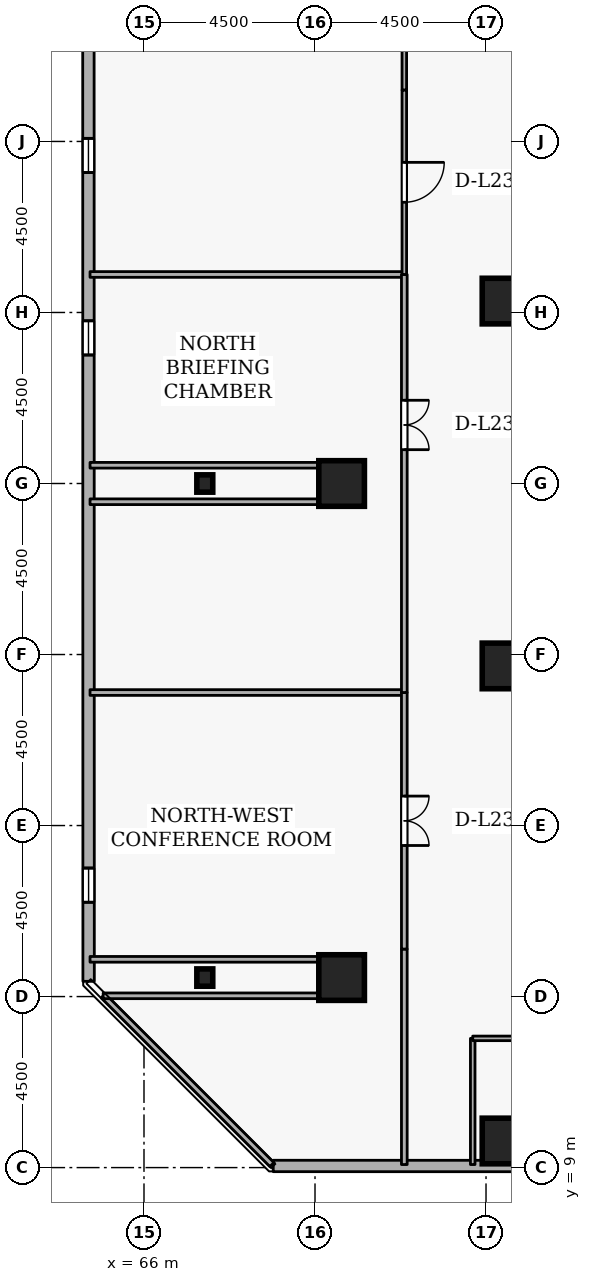
"""IFC4 building model, lengths in metres.
Left out: names, types, materials, properties, quantities, classifications, styles, units other than length and angle.
Written with IfcOpenShell. Run it as: python <this file> out.ifc"""

import sys

from ifc_helpers import new_model, si_unit, direction, frame, frame_2d, origin, origin_2d, place, context, subcontext, project, spatial, rectangle, i_section, extrude, element, fill, save


model = new_model("IFC4")
c1 = context("Model", 3, precision=1e-05, world=origin(), true_north=direction((0.0, 1.0)))
c2 = subcontext(c1, "Body", "Model", "MODEL_VIEW")
j1 = project(units=[si_unit("LENGTHUNIT", "METRE"), si_unit("PLANEANGLEUNIT", "RADIAN")], contexts=[c1])
p1 = place(None, origin())
s1 = spatial("IfcSite", under=j1, at=p1, CompositionType="ELEMENT")
p2 = place(p1, origin())
s2 = spatial("IfcBuilding", under=s1, at=p2, CompositionType="ELEMENT")
p3 = place(p2, frame((0.0, 0.0, 90.9)))
s3 = spatial("IfcBuildingStorey", under=s2, at=p3, CompositionType="ELEMENT", Elevation=90.9)
for number, where, z_axis, x_axis in (
    (1, (71.2, 14.0, 0.0), (0.0, 0.0, 1.0), (1.0, 0.0, 0.0)),
    (2, (71.2, 27.0, 0.0), (0.0, 0.0, 1.0), (1.0, 0.0, 0.0)),
    (3, (75.5, 9.7, 0.0), (0.0, 0.0, 1.0), (1.0, 0.0, 0.0)),
    (4, (75.5, 22.2, 0.0), (0.0, 0.0, 1.0), (1.0, 0.0, 0.0)),
    (5, (75.5, 31.8, 0.0), (0.0, 0.0, 1.0), (1.0, 0.0, 0.0)),
):
    element("IfcColumn", number, at=place(p3, frame(where, z_axis=z_axis, x_axis=x_axis)), inside=s3, PredefinedType="COLUMN", context=c2, shape_type="SweptSolid", body=[
        extrude(rectangle(XDim=1.2, YDim=1.2, at=origin_2d()), origin(), (0.0, 0.0, 1.0), 3.6),
    ])
for number, where, z_axis, x_axis in (
    (6, (67.6, 14.0, 0.0), (0.0, 0.0, 1.0), (1.0, 0.0, 0.0)),
    (7, (67.6, 27.0, 0.0), (0.0, 0.0, 1.0), (1.0, 0.0, 0.0)),
):
    element("IfcColumn", number, at=place(p3, frame(where, z_axis=z_axis, x_axis=x_axis)), inside=s3, PredefinedType="COLUMN", context=c2, shape_type="SweptSolid", body=[
        extrude(i_section(OverallWidth=0.418, OverallDepth=0.456, WebThickness=0.042, FlangeThickness=0.067, FilletRadius=0.015, at=origin_2d()), origin(), (0.0, 0.0, 1.0), 3.6),
    ])
p4 = place(p3, frame((69.401, 9.043, 0.0), z_axis=(0.0, 0.0, 1.0), x_axis=(0.99999997744, -0.000212414941, 0.0)))
e8 = element("IfcWall", 8, at=p4, inside=s3, PredefinedType="STANDARD", context=c2, shape_type="SweptSolid", body=[
    extrude(rectangle(XDim=34.481, YDim=0.3, at=frame_2d((17.24, 0.0))), origin(), (0.0, 0.0, 1.0), 2.7),
])
p5 = place(p4, frame((7.5, 0.0, 0.72)))
e9 = element("IfcOpeningElement", 9, at=p5, cuts=e8, PredefinedType="OPENING", context=c2, shape_type="SweptSolid", body=[
    extrude(rectangle(XDim=0.9, YDim=1.75, at=frame_2d((0.45, 0.875))), frame((0.0, 0.16, 0.0), z_axis=(0.0, -1.0, 0.0), x_axis=(1.0, 0.0, 0.0)), (0.0, 0.0, 1.0), 0.32),
])
p6 = place(p4, frame((12.3, 0.0, 0.72)))
e10 = element("IfcOpeningElement", 10, at=p6, cuts=e8, PredefinedType="OPENING", context=c2, shape_type="SweptSolid", body=[
    extrude(rectangle(XDim=0.9, YDim=1.75, at=frame_2d((0.45, 0.875))), frame((0.0, 0.16, 0.0), z_axis=(0.0, -1.0, 0.0), x_axis=(1.0, 0.0, 0.0)), (0.0, 0.0, 1.0), 0.32),
])
p7 = place(p4, frame((17.1, 0.0, 0.72)))
e11 = element("IfcOpeningElement", 11, at=p7, cuts=e8, PredefinedType="OPENING", context=c2, shape_type="SweptSolid", body=[
    extrude(rectangle(XDim=0.9, YDim=1.75, at=frame_2d((0.45, 0.875))), frame((0.0, 0.16, 0.0), z_axis=(0.0, -1.0, 0.0), x_axis=(1.0, 0.0, 0.0)), (0.0, 0.0, 1.0), 0.32),
])
p8 = place(p4, frame((21.9, 0.0, 0.72)))
e12 = element("IfcOpeningElement", 12, at=p8, cuts=e8, PredefinedType="OPENING", context=c2, shape_type="SweptSolid", body=[
    extrude(rectangle(XDim=0.9, YDim=1.75, at=frame_2d((0.45, 0.875))), frame((0.0, 0.16, 0.0), z_axis=(0.0, -1.0, 0.0), x_axis=(1.0, 0.0, 0.0)), (0.0, 0.0, 1.0), 0.32),
])
p9 = place(p4, frame((26.7, 0.0, 0.72)))
e13 = element("IfcOpeningElement", 13, at=p9, cuts=e8, PredefinedType="OPENING", context=c2, shape_type="SweptSolid", body=[
    extrude(rectangle(XDim=0.9, YDim=1.75, at=frame_2d((0.45, 0.875))), frame((0.0, 0.16, 0.0), z_axis=(0.0, -1.0, 0.0), x_axis=(1.0, 0.0, 0.0)), (0.0, 0.0, 1.0), 0.32),
])
p10 = place(p3, frame((64.535, 48.381, 0.0), z_axis=(0.0, 0.0, 1.0), x_axis=(0.000212414941, -0.99999997744, 0.0)))
e14 = element("IfcWall", 14, at=p10, inside=s3, PredefinedType="STANDARD", context=c2, shape_type="SweptSolid", body=[
    extrude(rectangle(XDim=34.481, YDim=0.3, at=frame_2d((17.24, 0.0))), origin(), (0.0, 0.0, 1.0), 2.7),
])
p11 = place(p10, frame((2.7, 0.0, 0.72)))
e15 = element("IfcOpeningElement", 15, at=p11, cuts=e14, PredefinedType="OPENING", context=c2, shape_type="SweptSolid", body=[
    extrude(rectangle(XDim=0.9, YDim=1.75, at=frame_2d((0.45, 0.875))), frame((0.0, 0.16, 0.0), z_axis=(0.0, -1.0, 0.0), x_axis=(1.0, 0.0, 0.0)), (0.0, 0.0, 1.0), 0.32),
])
p12 = place(p10, frame((12.3, 0.0, 0.72)))
e16 = element("IfcOpeningElement", 16, at=p12, cuts=e14, PredefinedType="OPENING", context=c2, shape_type="SweptSolid", body=[
    extrude(rectangle(XDim=0.9, YDim=1.75, at=frame_2d((0.45, 0.875))), frame((0.0, 0.16, 0.0), z_axis=(0.0, -1.0, 0.0), x_axis=(1.0, 0.0, 0.0)), (0.0, 0.0, 1.0), 0.32),
])
p13 = place(p10, frame((17.1, 0.0, 0.72)))
e17 = element("IfcOpeningElement", 17, at=p13, cuts=e14, PredefinedType="OPENING", context=c2, shape_type="SweptSolid", body=[
    extrude(rectangle(XDim=0.9, YDim=1.75, at=frame_2d((0.45, 0.875))), frame((0.0, 0.16, 0.0), z_axis=(0.0, -1.0, 0.0), x_axis=(1.0, 0.0, 0.0)), (0.0, 0.0, 1.0), 0.32),
])
p14 = place(p10, frame((31.5, 0.0, 0.72)))
e18 = element("IfcOpeningElement", 18, at=p14, cuts=e14, PredefinedType="OPENING", context=c2, shape_type="SweptSolid", body=[
    extrude(rectangle(XDim=0.9, YDim=1.75, at=frame_2d((0.45, 0.875))), frame((0.0, 0.16, 0.0), z_axis=(0.0, -1.0, 0.0), x_axis=(1.0, 0.0, 0.0)), (0.0, 0.0, 1.0), 0.32),
])
p15 = place(p3, frame((74.65, 9.08, 0.0), z_axis=(0.0, 0.0, 1.0), x_axis=(0.0, 1.0, 0.0)))
e19 = element("IfcWall", 19, at=p15, inside=s3, PredefinedType="PARTITIONING", context=c2, shape_type="SweptSolid", body=[
    extrude(rectangle(XDim=3.32, YDim=0.12, at=frame_2d((1.66, 0.0))), origin(), (0.0, 0.0, 1.0), 3.34),
])
p16 = place(p3, frame((74.65, 12.4, 0.0), z_axis=(0.0, 0.0, 1.0), x_axis=(1.0, 0.0, 0.0)))
e20 = element("IfcWall", 20, at=p16, inside=s3, PredefinedType="PARTITIONING", context=c2, shape_type="SweptSolid", body=[
    extrude(rectangle(XDim=4.802, YDim=0.12, at=frame_2d((2.401, 0.0))), origin(), (0.0, 0.0, 1.0), 3.34),
])
p17 = place(p3, frame((72.85, 14.75, 0.0), z_axis=(0.0, 0.0, 1.0), x_axis=(0.0, -1.0, 0.0)))
e21 = element("IfcWall", 21, at=p17, inside=s3, PredefinedType="PARTITIONING", context=c2, shape_type="SweptSolid", body=[
    extrude(rectangle(XDim=5.67, YDim=0.15, at=frame_2d((2.835, 0.0))), origin(), (0.0, 0.0, 1.0), 3.34),
])
p18 = place(p3, frame((69.365, 9.08, 0.0), z_axis=(0.0, 0.0, 1.0), x_axis=(-0.707106781187, 0.707106781187, 0.0)))
e22 = element("IfcWall", 22, at=p18, inside=s3, PredefinedType="PARTITIONING", context=c2, shape_type="SweptSolid", body=[
    extrude(rectangle(XDim=6.279, YDim=0.15, at=frame_2d((3.14, 0.0))), origin(), (0.0, 0.0, 1.0), 3.34),
])
p19 = place(p3, frame((64.926, 13.52, 0.0), z_axis=(0.0, 0.0, 1.0), x_axis=(1.0, 0.0, 0.0)))
e23 = element("IfcWall", 23, at=p19, inside=s3, PredefinedType="PARTITIONING", context=c2, shape_type="SweptSolid", body=[
    extrude(rectangle(XDim=6.274, YDim=0.15, at=frame_2d((3.137, 0.0))), origin(), (0.0, 0.0, 1.0), 3.34),
])
p20 = place(p3, frame((71.2, 14.48, 0.0), z_axis=(0.0, 0.0, 1.0), x_axis=(-1.0, 0.0, 0.0)))
e24 = element("IfcWall", 24, at=p20, inside=s3, PredefinedType="PARTITIONING", context=c2, shape_type="SweptSolid", body=[
    extrude(rectangle(XDim=6.62, YDim=0.15, at=frame_2d((3.31, 0.0))), origin(), (0.0, 0.0, 1.0), 3.34),
])
p21 = place(p3, frame((64.58, 21.5, 0.0), z_axis=(0.0, 0.0, 1.0), x_axis=(1.0, 0.0, 0.0)))
e25 = element("IfcWall", 25, at=p21, inside=s3, PredefinedType="PARTITIONING", context=c2, shape_type="SweptSolid", body=[
    extrude(rectangle(XDim=8.27, YDim=0.15, at=frame_2d((4.135, 0.0))), origin(), (0.0, 0.0, 1.0), 3.34),
])
p22 = place(p3, frame((72.85, 21.5, 0.0), z_axis=(0.0, 0.0, 1.0), x_axis=(0.0, -1.0, 0.0)))
e26 = element("IfcWall", 26, at=p22, inside=s3, PredefinedType="PARTITIONING", context=c2, shape_type="SweptSolid", body=[
    extrude(rectangle(XDim=6.75, YDim=0.15, at=frame_2d((3.375, 0.0))), origin(), (0.0, 0.0, 1.0), 3.34),
])
p23 = place(p22, frame((2.725, 0.0, 0.0)))
e27 = element("IfcOpeningElement", 27, at=p23, cuts=e26, PredefinedType="OPENING", context=c2, shape_type="SweptSolid", body=[
    extrude(rectangle(XDim=1.3, YDim=2.12, at=frame_2d((0.65, 1.06))), frame((0.0, 0.085, 0.0), z_axis=(0.0, -1.0, 0.0), x_axis=(1.0, 0.0, 0.0)), (0.0, 0.0, 1.0), 0.17),
])
for number, where, z_axis, x_axis in (
    (28, (64.58, 26.52, 0.0), (0.0, 0.0, 1.0), (1.0, 0.0, 0.0)),
    (29, (71.2, 27.48, 0.0), (0.0, 0.0, 1.0), (-1.0, 0.0, 0.0)),
):
    element("IfcWall", number, at=place(p3, frame(where, z_axis=z_axis, x_axis=x_axis)), inside=s3, PredefinedType="PARTITIONING", context=c2, shape_type="SweptSolid", body=[
        extrude(rectangle(XDim=6.62, YDim=0.15, at=frame_2d((3.31, 0.0))), origin(), (0.0, 0.0, 1.0), 3.34),
    ])
p24 = place(p3, frame((64.58, 32.5, 0.0), z_axis=(0.0, 0.0, 1.0), x_axis=(1.0, 0.0, 0.0)))
e30 = element("IfcWall", 30, at=p24, inside=s3, PredefinedType="PARTITIONING", context=c2, shape_type="SweptSolid", body=[
    extrude(rectangle(XDim=8.27, YDim=0.15, at=frame_2d((4.135, 0.0))), origin(), (0.0, 0.0, 1.0), 3.34),
])
p25 = place(p3, frame((72.85, 32.5, 0.0), z_axis=(0.0, 0.0, 1.0), x_axis=(0.0, -1.0, 0.0)))
e31 = element("IfcWall", 31, at=p25, inside=s3, PredefinedType="PARTITIONING", context=c2, shape_type="SweptSolid", body=[
    extrude(rectangle(XDim=11.0, YDim=0.15, at=frame_2d((5.5, 0.0))), origin(), (0.0, 0.0, 1.0), 3.34),
])
p26 = place(p25, frame((3.31, 0.0, 0.0)))
e32 = element("IfcOpeningElement", 32, at=p26, cuts=e31, PredefinedType="OPENING", context=c2, shape_type="SweptSolid", body=[
    extrude(rectangle(XDim=1.3, YDim=2.12, at=frame_2d((0.65, 1.06))), frame((0.0, 0.085, 0.0), z_axis=(0.0, -1.0, 0.0), x_axis=(1.0, 0.0, 0.0)), (0.0, 0.0, 1.0), 0.17),
])
p27 = place(p3, frame((72.85, 39.25, 0.0), z_axis=(0.0, 0.0, 1.0), x_axis=(0.0, -1.0, 0.0)))
e33 = element("IfcWall", 33, at=p27, inside=s3, PredefinedType="PARTITIONING", context=c2, shape_type="SweptSolid", body=[
    extrude(rectangle(XDim=1.9, YDim=0.12, at=frame_2d((0.95, 0.0))), origin(), (0.0, 0.0, 1.0), 2.895),
])
p28 = place(p3, frame((72.85, 37.35, 0.0), z_axis=(0.0, 0.0, 1.0), x_axis=(0.0, -1.0, 0.0)))
e34 = element("IfcWall", 34, at=p28, inside=s3, PredefinedType="PARTITIONING", context=c2, shape_type="SweptSolid", body=[
    extrude(rectangle(XDim=4.85, YDim=0.12, at=frame_2d((2.425, 0.0))), origin(), (0.0, 0.0, 1.0), 2.895),
])
p29 = place(p28, frame((1.9, 0.0, 0.0)))
e35 = element("IfcOpeningElement", 35, at=p29, cuts=e34, PredefinedType="OPENING", context=c2, shape_type="SweptSolid", body=[
    extrude(rectangle(XDim=1.05, YDim=2.1, at=frame_2d((0.525, 1.05))), frame((0.0, 0.07, 0.0), z_axis=(0.0, -1.0, 0.0), x_axis=(1.0, 0.0, 0.0)), (0.0, 0.0, 1.0), 0.14),
])
p30 = place(p12, origin())
e36 = element("IfcWindow", 36, at=p30, inside=s3, PartitioningType="SINGLE_PANEL", PredefinedType="WINDOW", context=c2, shape_type="SweptSolid", body=[
    extrude(rectangle(XDim=0.9, YDim=1.75, at=frame_2d((0.45, 0.875))), frame((0.0, 0.03, 0.0), z_axis=(0.0, -1.0, 0.0), x_axis=(1.0, 0.0, 0.0)), (0.0, 0.0, 1.0), 0.06),
])
fill(e16, e36)
p31 = place(p13, origin())
e37 = element("IfcWindow", 37, at=p31, inside=s3, PartitioningType="SINGLE_PANEL", PredefinedType="WINDOW", context=c2, shape_type="SweptSolid", body=[
    extrude(rectangle(XDim=0.9, YDim=1.75, at=frame_2d((0.45, 0.875))), frame((0.0, 0.03, 0.0), z_axis=(0.0, -1.0, 0.0), x_axis=(1.0, 0.0, 0.0)), (0.0, 0.0, 1.0), 0.06),
])
fill(e17, e37)
p32 = place(p14, origin())
e38 = element("IfcWindow", 38, at=p32, inside=s3, PartitioningType="SINGLE_PANEL", PredefinedType="WINDOW", context=c2, shape_type="SweptSolid", body=[
    extrude(rectangle(XDim=0.9, YDim=1.75, at=frame_2d((0.45, 0.875))), frame((0.0, 0.03, 0.0), z_axis=(0.0, -1.0, 0.0), x_axis=(1.0, 0.0, 0.0)), (0.0, 0.0, 1.0), 0.06),
])
fill(e18, e38)
p33 = place(p23, origin())
e39 = element("IfcDoor", 39, at=p33, inside=s3, OperationType="DOUBLE_DOOR_SINGLE_SWING", PredefinedType="DOOR", context=c2, shape_type="SweptSolid", body=[
    extrude(rectangle(XDim=1.3, YDim=2.12, at=frame_2d((0.65, 1.06))), frame((0.0, 0.025, 0.0), z_axis=(0.0, -1.0, 0.0), x_axis=(1.0, 0.0, 0.0)), (0.0, 0.0, 1.0), 0.05),
])
fill(e27, e39)
p34 = place(p26, origin())
e40 = element("IfcDoor", 40, at=p34, inside=s3, OperationType="DOUBLE_DOOR_SINGLE_SWING", PredefinedType="DOOR", context=c2, shape_type="SweptSolid", body=[
    extrude(rectangle(XDim=1.3, YDim=2.12, at=frame_2d((0.65, 1.06))), frame((0.0, 0.025, 0.0), z_axis=(0.0, -1.0, 0.0), x_axis=(1.0, 0.0, 0.0)), (0.0, 0.0, 1.0), 0.05),
])
fill(e32, e40)
p35 = place(p29, origin())
e41 = element("IfcDoor", 41, at=p35, inside=s3, OperationType="SINGLE_SWING_LEFT", PredefinedType="DOOR", context=c2, shape_type="SweptSolid", body=[
    extrude(rectangle(XDim=1.05, YDim=2.1, at=frame_2d((0.525, 1.05))), frame((0.0, 0.025, 0.0), z_axis=(0.0, -1.0, 0.0), x_axis=(1.0, 0.0, 0.0)), (0.0, 0.0, 1.0), 0.05),
])
fill(e35, e41)
save(model, sys.argv[1])
